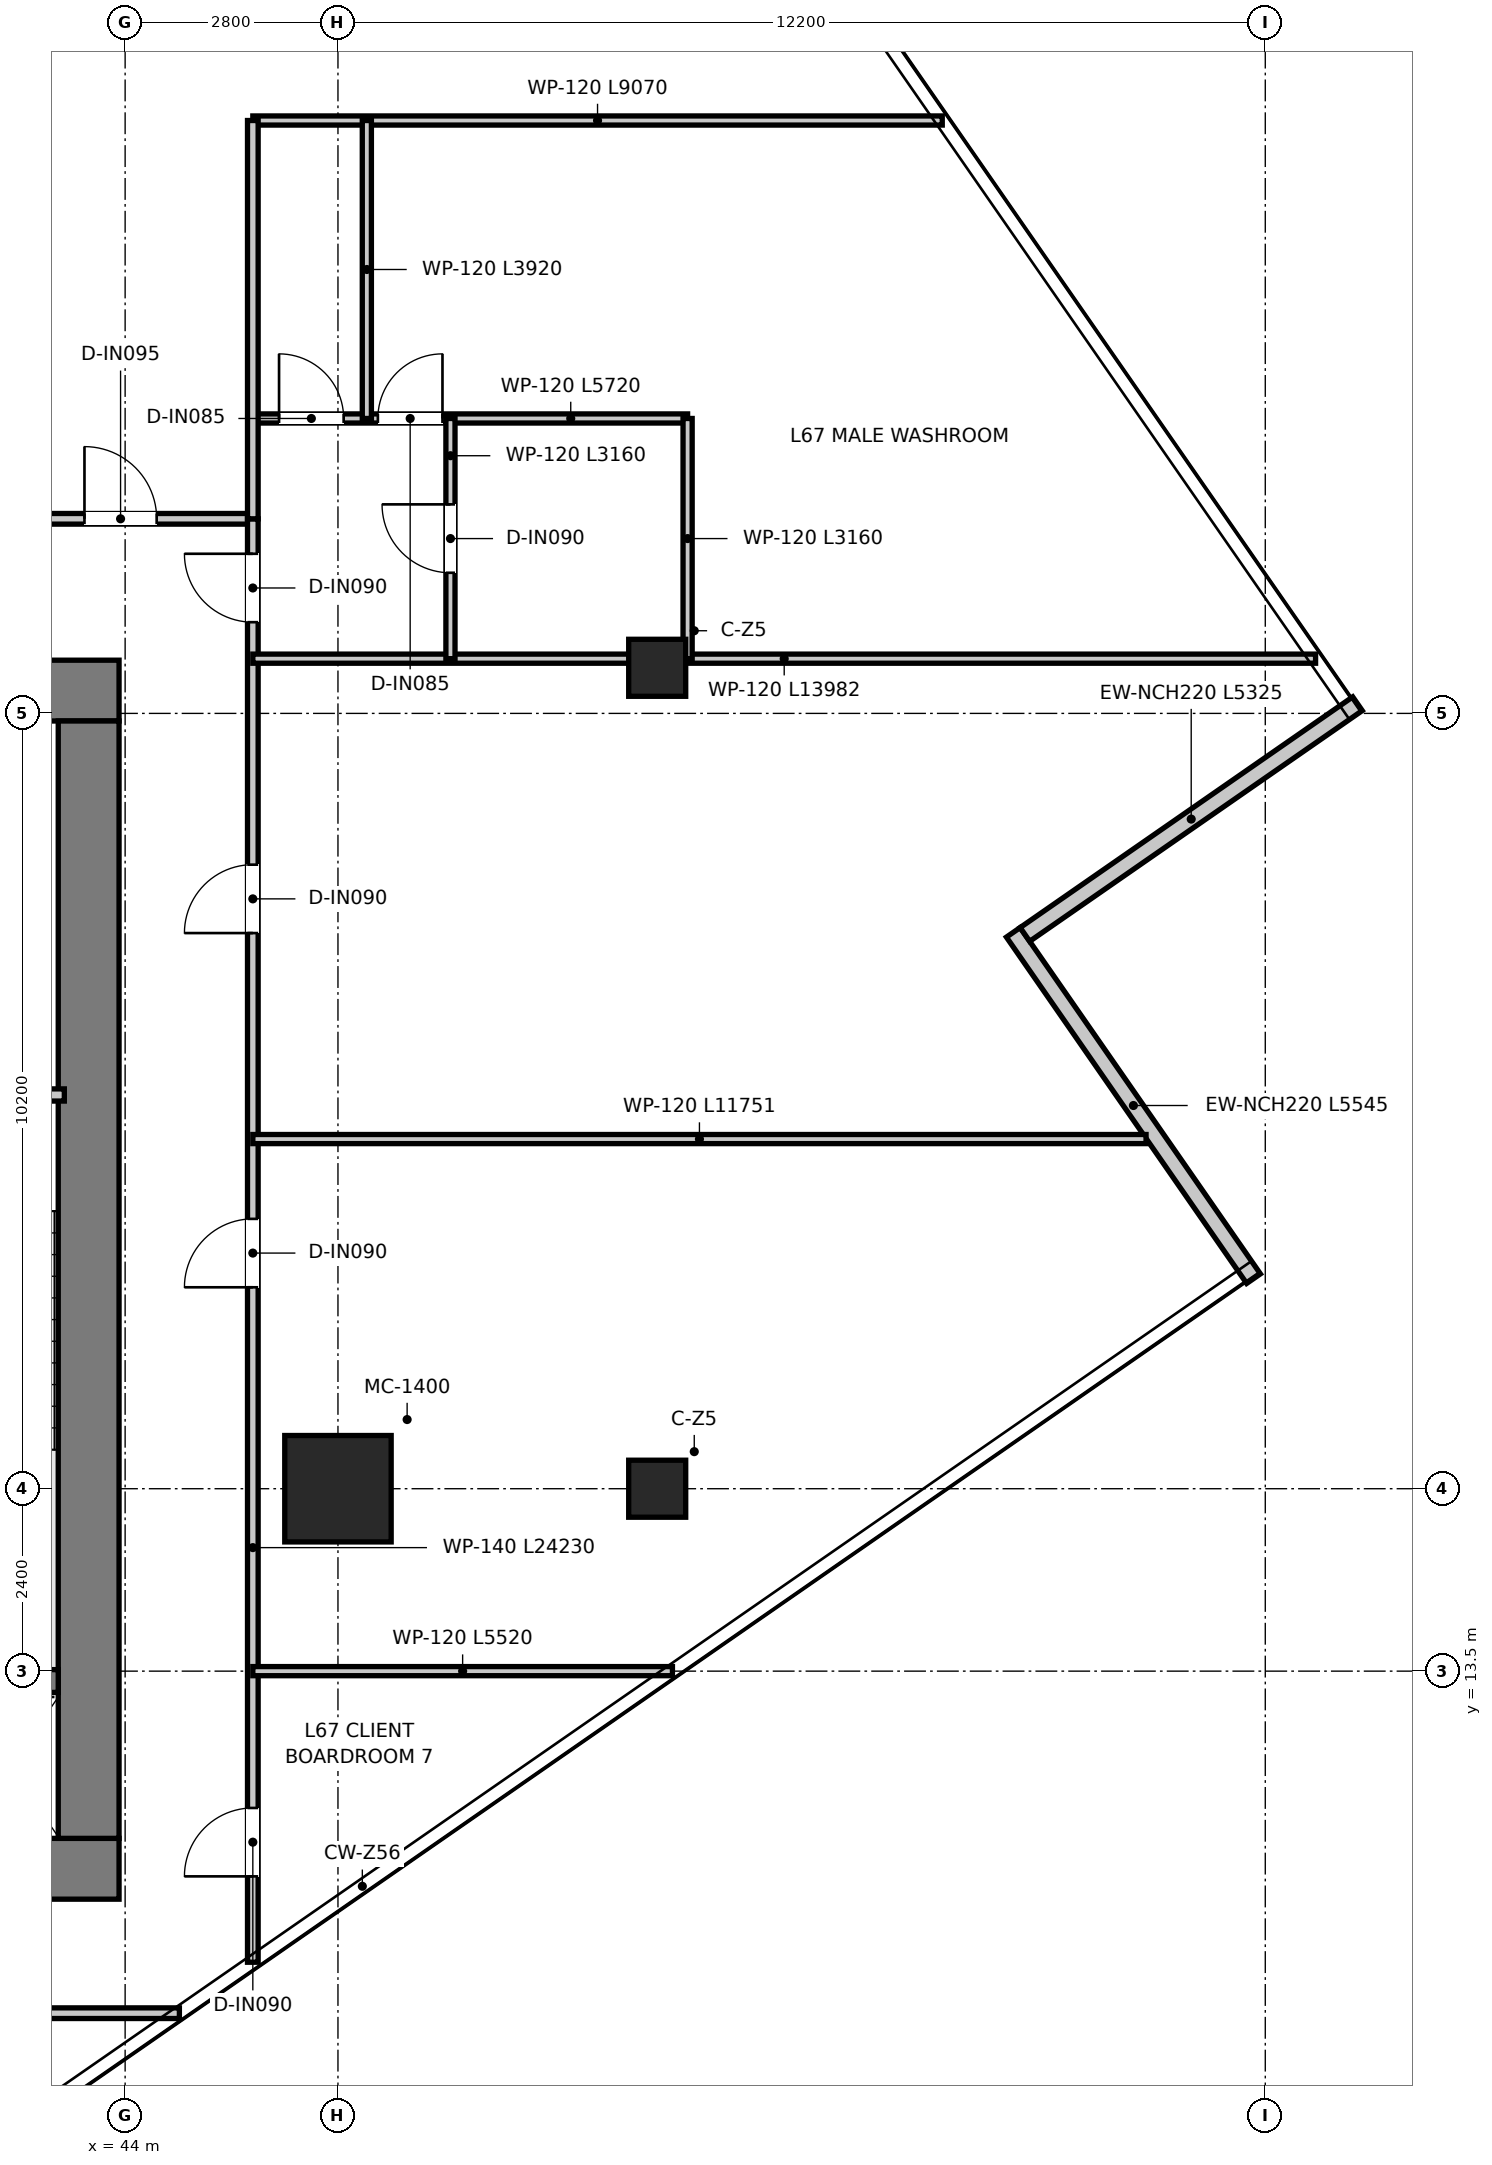
"""IFC4 building model, lengths in metres.
Left out: names, types, materials, properties, quantities, classifications, styles, units other than length and angle.
Written with IfcOpenShell. Run it as: python <this file> out.ifc"""

import sys

from ifc_helpers import new_model, si_unit, direction, frame, frame_2d, origin, origin_2d, place, context, subcontext, project, spatial, rectangle, extrude, source, transform, mapped, element, fill, save


model = new_model("IFC4")
c1 = context("Model", 3, precision=1e-05, world=origin(), true_north=direction((0.0, 1.0)))
c2 = subcontext(c1, "Body", "Model", "MODEL_VIEW")
j1 = project(units=[si_unit("LENGTHUNIT", "METRE"), si_unit("PLANEANGLEUNIT", "RADIAN")], contexts=[c1])
p1 = place(None, origin())
s1 = spatial("IfcSite", under=j1, at=p1, CompositionType="ELEMENT")
p2 = place(p1, origin())
s2 = spatial("IfcBuilding", under=s1, at=p2, CompositionType="ELEMENT")
p3 = place(p2, frame((0.0, 0.0, 275.3)))
s3 = spatial("IfcBuildingStorey", under=s2, at=p3, CompositionType="ELEMENT", Elevation=275.3)
p4 = place(p3, frame((28.08, 10.9, 0.0), z_axis=(0.0, 0.0, 1.0), x_axis=(1.0, 0.0, 0.0)))
e1 = element("IfcWall", 1, at=p4, inside=s3, PredefinedType="SHEAR", context=c2, shape_type="SweptSolid", body=[
    extrude(rectangle(XDim=15.84, YDim=0.8, at=frame_2d((7.92, 0.0))), origin(), (0.0, 0.0, 1.0), 3.95),
])
p5 = place(p3, frame((28.08, 26.4, 0.0), z_axis=(0.0, 0.0, 1.0), x_axis=(1.0, 0.0, 0.0)))
e2 = element("IfcWall", 2, at=p5, inside=s3, PredefinedType="SHEAR", context=c2, shape_type="SweptSolid", body=[
    extrude(rectangle(XDim=15.84, YDim=0.8, at=frame_2d((7.92, 0.0))), origin(), (0.0, 0.0, 1.0), 3.95),
])
p6 = place(p5, frame((7.22, 0.0, 0.0)))
e3 = element("IfcOpeningElement", 3, at=p6, cuts=e2, PredefinedType="OPENING", context=c2, shape_type="SweptSolid", body=[
    extrude(rectangle(XDim=1.4, YDim=2.2, at=frame_2d((0.7, 1.1))), frame((0.0, 0.41, 0.0), z_axis=(0.0, -1.0, 0.0), x_axis=(1.0, 0.0, 0.0)), (0.0, 0.0, 1.0), 0.82),
])
p7 = place(p5, frame((1.775, 0.0, 0.0)))
e4 = element("IfcOpeningElement", 4, at=p7, cuts=e2, PredefinedType="OPENING", context=c2, shape_type="SweptSolid", body=[
    extrude(rectangle(XDim=1.05, YDim=2.1, at=frame_2d((0.525, 1.05))), frame((0.0, 0.41, 0.0), z_axis=(0.0, -1.0, 0.0), x_axis=(1.0, 0.0, 0.0)), (0.0, 0.0, 1.0), 0.82),
])
p8 = place(p5, frame((13.015, 0.0, 0.0)))
e5 = element("IfcOpeningElement", 5, at=p8, cuts=e2, PredefinedType="OPENING", context=c2, shape_type="SweptSolid", body=[
    extrude(rectangle(XDim=1.05, YDim=2.1, at=frame_2d((0.525, 1.05))), frame((0.0, 0.41, 0.0), z_axis=(0.0, -1.0, 0.0), x_axis=(1.0, 0.0, 0.0)), (0.0, 0.0, 1.0), 0.82),
])
p9 = place(p3, frame((43.52, 11.3, 0.0), z_axis=(0.0, 0.0, 1.0), x_axis=(0.0, 1.0, 0.0)))
e6 = element("IfcWall", 6, at=p9, inside=s3, PredefinedType="SHEAR", context=c2, shape_type="SweptSolid", body=[
    extrude(rectangle(XDim=14.7, YDim=0.8, at=frame_2d((7.35, 0.0))), origin(), (0.0, 0.0, 1.0), 3.95),
])
p10 = place(p3, frame((40.02, 13.37, 0.0), z_axis=(0.0, 0.0, 1.0), x_axis=(1.0, 0.0, 0.0)))
e7 = element("IfcWall", 7, at=p10, inside=s3, PredefinedType="SHEAR", context=c2, shape_type="SweptSolid", body=[
    extrude(rectangle(XDim=3.1, YDim=0.3, at=frame_2d((1.55, 0.0))), origin(), (0.0, 0.0, 1.0), 3.95),
])
m1 = source(origin(), c2, "Body", "SweptSolid", [
    extrude(rectangle(XDim=1.4, YDim=1.4, at=origin_2d()), origin(), (0.0, 0.0, 1.0), 3.95),
])
p11 = place(p3, frame((46.8, 15.9, 0.0), z_axis=(0.0, 0.0, 1.0), x_axis=(1.0, 0.0, 0.0)))
e8 = element("IfcColumn", 8, at=p11, inside=s3, PredefinedType="USERDEFINED", context=c2, shape_type="MappedRepresentation", body=[
    mapped(m1, transform((0.0, 0.0, 0.0), x_axis=(1.0, 0.0, 0.0), y_axis=(0.0, 1.0, 0.0), z_axis=(0.0, 0.0, 1.0), scale=1.0)),
])
m2 = source(origin(), c2, "Body", "SweptSolid", [
    extrude(rectangle(XDim=0.75, YDim=0.75, at=origin_2d()), origin(), (0.0, 0.0, 1.0), 3.95),
])
for number, where, z_axis, x_axis in (
    (9, (51.0, 26.7, 0.0), (0.0, 0.0, 1.0), (1.0, 0.0, 0.0)),
    (10, (51.0, 15.9, 0.0), (0.0, 0.0, 1.0), (1.0, 0.0, 0.0)),
):
    element("IfcColumn", number, at=place(p3, frame(where, z_axis=z_axis, x_axis=x_axis)), inside=s3, PredefinedType="COLUMN", context=c2, shape_type="MappedRepresentation", body=[
        mapped(m2, transform((0.0, 0.0, 0.0), x_axis=(1.0, 0.0, 0.0), y_axis=(0.0, 1.0, 0.0), z_axis=(0.0, 0.0, 1.0), scale=1.0)),
    ])
p12 = place(p3, frame((58.845, 18.663, 0.0), z_axis=(0.0, 0.0, 1.0), x_axis=(-0.569988141022, 0.821652918874, 0.0)))
e11 = element("IfcWall", 11, at=p12, inside=s3, PredefinedType="ELEMENTEDWALL", context=c2, shape_type="SweptSolid", body=[
    extrude(rectangle(XDim=5.545, YDim=0.22, at=frame_2d((2.772, 0.0))), origin(), (0.0, 0.0, 1.0), 3.67),
])
p13 = place(p3, frame((55.838, 23.192, 0.0), z_axis=(0.0, 0.0, 1.0), x_axis=(0.821652092748, 0.569989331903, 0.0)))
e12 = element("IfcWall", 12, at=p13, inside=s3, PredefinedType="ELEMENTEDWALL", context=c2, shape_type="SweptSolid", body=[
    extrude(rectangle(XDim=5.325, YDim=0.22, at=frame_2d((2.663, 0.0))), origin(), (0.0, 0.0, 1.0), 3.67),
])
p14 = place(p3, frame((40.04, 21.08, 0.0), z_axis=(0.0, 0.0, 1.0), x_axis=(1.0, 0.0, 0.0)))
e13 = element("IfcWall", 13, at=p14, inside=s3, PredefinedType="PARTITIONING", context=c2, shape_type="SweptSolid", body=[
    extrude(rectangle(XDim=3.16, YDim=0.16, at=frame_2d((1.58, 0.0))), origin(), (0.0, 0.0, 1.0), 3.67),
])
p15 = place(p14, frame((1.055, 0.0, 0.0)))
e14 = element("IfcOpeningElement", 14, at=p15, cuts=e13, PredefinedType="OPENING", context=c2, shape_type="SweptSolid", body=[
    extrude(rectangle(XDim=1.05, YDim=2.1, at=frame_2d((0.525, 1.05))), frame((0.0, 0.09, 0.0), z_axis=(0.0, -1.0, 0.0), x_axis=(1.0, 0.0, 0.0)), (0.0, 0.0, 1.0), 0.18),
])
p16 = place(p3, frame((26.32, 28.66, 0.0), z_axis=(0.0, 0.0, 1.0), x_axis=(1.0, 0.0, 0.0)))
e15 = element("IfcWall", 15, at=p16, inside=s3, PredefinedType="PARTITIONING", context=c2, shape_type="SweptSolid", body=[
    extrude(rectangle(XDim=19.36, YDim=0.14, at=frame_2d((9.68, 0.0))), origin(), (0.0, 0.0, 1.0), 3.18),
])
p17 = place(p16, frame((1.265, 0.0, 0.0)))
e16 = element("IfcOpeningElement", 16, at=p17, cuts=e15, PredefinedType="OPENING", context=c2, shape_type="SweptSolid", body=[
    extrude(rectangle(XDim=0.95, YDim=2.1, at=frame_2d((0.475, 1.05))), frame((0.0, 0.08, 0.0), z_axis=(0.0, -1.0, 0.0), x_axis=(1.0, 0.0, 0.0)), (0.0, 0.0, 1.0), 0.16),
])
p18 = place(p16, frame((6.105, 0.0, 0.0)))
e17 = element("IfcOpeningElement", 17, at=p18, cuts=e15, PredefinedType="OPENING", context=c2, shape_type="SweptSolid", body=[
    extrude(rectangle(XDim=0.95, YDim=2.1, at=frame_2d((0.475, 1.05))), frame((0.0, 0.08, 0.0), z_axis=(0.0, -1.0, 0.0), x_axis=(1.0, 0.0, 0.0)), (0.0, 0.0, 1.0), 0.16),
])
p19 = place(p16, frame((12.305, 0.0, 0.0)))
e18 = element("IfcOpeningElement", 18, at=p19, cuts=e15, PredefinedType="OPENING", context=c2, shape_type="SweptSolid", body=[
    extrude(rectangle(XDim=0.95, YDim=2.1, at=frame_2d((0.475, 1.05))), frame((0.0, 0.08, 0.0), z_axis=(0.0, -1.0, 0.0), x_axis=(1.0, 0.0, 0.0)), (0.0, 0.0, 1.0), 0.16),
])
p20 = place(p16, frame((17.145, 0.0, 0.0)))
e19 = element("IfcOpeningElement", 19, at=p20, cuts=e15, PredefinedType="OPENING", context=c2, shape_type="SweptSolid", body=[
    extrude(rectangle(XDim=0.95, YDim=2.1, at=frame_2d((0.475, 1.05))), frame((0.0, 0.08, 0.0), z_axis=(0.0, -1.0, 0.0), x_axis=(1.0, 0.0, 0.0)), (0.0, 0.0, 1.0), 0.16),
])
p21 = place(p3, frame((45.68, 9.67, 0.0), z_axis=(0.0, 0.0, 1.0), x_axis=(0.0, 1.0, 0.0)))
e20 = element("IfcWall", 20, at=p21, inside=s3, PredefinedType="PARTITIONING", context=c2, shape_type="SweptSolid", body=[
    extrude(rectangle(XDim=18.99, YDim=0.14, at=frame_2d((9.495, 0.0))), origin(), (0.0, 0.0, 1.0), 3.13),
])
p22 = place(p21, frame((17.63, 0.0, 0.0)))
e21 = element("IfcOpeningElement", 21, at=p22, cuts=e20, PredefinedType="OPENING", context=c2, shape_type="SweptSolid", body=[
    extrude(rectangle(XDim=0.9, YDim=2.1, at=frame_2d((0.45, 1.05))), frame((0.0, 0.08, 0.0), z_axis=(0.0, -1.0, 0.0), x_axis=(1.0, 0.0, 0.0)), (0.0, 0.0, 1.0), 0.16),
])
p23 = place(p21, frame((1.13, 0.0, 0.0)))
e22 = element("IfcOpeningElement", 22, at=p23, cuts=e20, PredefinedType="OPENING", context=c2, shape_type="SweptSolid", body=[
    extrude(rectangle(XDim=0.9, YDim=2.1, at=frame_2d((0.45, 1.05))), frame((0.0, 0.08, 0.0), z_axis=(0.0, -1.0, 0.0), x_axis=(1.0, 0.0, 0.0)), (0.0, 0.0, 1.0), 0.16),
])
p24 = place(p21, frame((8.88, 0.0, 0.0)))
e23 = element("IfcOpeningElement", 23, at=p24, cuts=e20, PredefinedType="OPENING", context=c2, shape_type="SweptSolid", body=[
    extrude(rectangle(XDim=0.9, YDim=2.1, at=frame_2d((0.45, 1.05))), frame((0.0, 0.08, 0.0), z_axis=(0.0, -1.0, 0.0), x_axis=(1.0, 0.0, 0.0)), (0.0, 0.0, 1.0), 0.16),
])
p25 = place(p21, frame((13.54, 0.0, 0.0)))
e24 = element("IfcOpeningElement", 24, at=p25, cuts=e20, PredefinedType="OPENING", context=c2, shape_type="SweptSolid", body=[
    extrude(rectangle(XDim=0.9, YDim=2.1, at=frame_2d((0.45, 1.05))), frame((0.0, 0.08, 0.0), z_axis=(0.0, -1.0, 0.0), x_axis=(1.0, 0.0, 0.0)), (0.0, 0.0, 1.0), 0.16),
])
p26 = place(p3, frame((24.534, 9.0, 0.0), z_axis=(0.0, 0.0, 1.0), x_axis=(1.0, 0.0, 0.0)))
e25 = element("IfcWall", 25, at=p26, inside=s3, PredefinedType="PARTITIONING", context=c2, shape_type="SweptSolid", body=[
    extrude(rectangle(XDim=20.18, YDim=0.14, at=frame_2d((10.09, 0.0))), origin(), (0.0, 0.0, 1.0), 3.67),
])
p27 = place(p26, frame((7.041, 0.0, 0.0)))
e26 = element("IfcOpeningElement", 26, at=p27, cuts=e25, PredefinedType="OPENING", context=c2, shape_type="SweptSolid", body=[
    extrude(rectangle(XDim=0.85, YDim=2.1, at=frame_2d((0.425, 1.05))), frame((0.0, 0.08, 0.0), z_axis=(0.0, -1.0, 0.0), x_axis=(1.0, 0.0, 0.0)), (0.0, 0.0, 1.0), 0.16),
])
p28 = place(p26, frame((15.041, 0.0, 0.0)))
e27 = element("IfcOpeningElement", 27, at=p28, cuts=e25, PredefinedType="OPENING", context=c2, shape_type="SweptSolid", body=[
    extrude(rectangle(XDim=0.85, YDim=2.1, at=frame_2d((0.425, 1.05))), frame((0.0, 0.08, 0.0), z_axis=(0.0, -1.0, 0.0), x_axis=(1.0, 0.0, 0.0)), (0.0, 0.0, 1.0), 0.16),
])
p29 = place(p3, frame((45.68, 26.82, 0.0), z_axis=(0.0, 0.0, 1.0), x_axis=(1.0, 0.0, 0.0)))
e28 = element("IfcWall", 28, at=p29, inside=s3, PredefinedType="PARTITIONING", context=c2, shape_type="SweptSolid", body=[
    extrude(rectangle(XDim=13.982, YDim=0.12, at=frame_2d((6.991, 0.0))), origin(), (0.0, 0.0, 1.0), 3.13),
])
p30 = place(p3, frame((45.68, 33.9, 0.0), z_axis=(0.0, 0.0, 1.0), x_axis=(1.0, 0.0, 0.0)))
e29 = element("IfcWall", 29, at=p30, inside=s3, PredefinedType="PARTITIONING", context=c2, shape_type="SweptSolid", body=[
    extrude(rectangle(XDim=9.07, YDim=0.12, at=frame_2d((4.535, 0.0))), origin(), (0.0, 0.0, 1.0), 3.13),
])
p31 = place(p3, frame((45.68, 29.98, 0.0), z_axis=(0.0, 0.0, 1.0), x_axis=(1.0, 0.0, 0.0)))
e30 = element("IfcWall", 30, at=p31, inside=s3, PredefinedType="PARTITIONING", context=c2, shape_type="SweptSolid", body=[
    extrude(rectangle(XDim=5.72, YDim=0.12, at=frame_2d((2.86, 0.0))), origin(), (0.0, 0.0, 1.0), 3.13),
])
p32 = place(p31, frame((1.645, 0.0, 0.0)))
e31 = element("IfcOpeningElement", 31, at=p32, cuts=e30, PredefinedType="OPENING", context=c2, shape_type="SweptSolid", body=[
    extrude(rectangle(XDim=0.85, YDim=2.1, at=frame_2d((0.425, 1.05))), frame((0.0, 0.07, 0.0), z_axis=(0.0, -1.0, 0.0), x_axis=(1.0, 0.0, 0.0)), (0.0, 0.0, 1.0), 0.14),
])
p33 = place(p31, frame((0.345, 0.0, 0.0)))
e32 = element("IfcOpeningElement", 32, at=p33, cuts=e30, PredefinedType="OPENING", context=c2, shape_type="SweptSolid", body=[
    extrude(rectangle(XDim=0.85, YDim=2.1, at=frame_2d((0.425, 1.05))), frame((0.0, 0.07, 0.0), z_axis=(0.0, -1.0, 0.0), x_axis=(1.0, 0.0, 0.0)), (0.0, 0.0, 1.0), 0.14),
])
p34 = place(p3, frame((51.4, 26.82, 0.0), z_axis=(0.0, 0.0, 1.0), x_axis=(0.0, 1.0, 0.0)))
e33 = element("IfcWall", 33, at=p34, inside=s3, PredefinedType="PARTITIONING", context=c2, shape_type="SweptSolid", body=[
    extrude(rectangle(XDim=3.16, YDim=0.12, at=frame_2d((1.58, 0.0))), origin(), (0.0, 0.0, 1.0), 3.67),
])
p35 = place(p3, frame((48.28, 26.82, 0.0), z_axis=(0.0, 0.0, 1.0), x_axis=(0.0, 1.0, 0.0)))
e34 = element("IfcWall", 34, at=p35, inside=s3, PredefinedType="PARTITIONING", context=c2, shape_type="SweptSolid", body=[
    extrude(rectangle(XDim=3.16, YDim=0.12, at=frame_2d((1.58, 0.0))), origin(), (0.0, 0.0, 1.0), 3.18),
])
p36 = place(p35, frame((1.13, 0.0, 0.0)))
e35 = element("IfcOpeningElement", 35, at=p36, cuts=e34, PredefinedType="OPENING", context=c2, shape_type="SweptSolid", body=[
    extrude(rectangle(XDim=0.9, YDim=2.1, at=frame_2d((0.45, 1.05))), frame((0.0, 0.07, 0.0), z_axis=(0.0, -1.0, 0.0), x_axis=(1.0, 0.0, 0.0)), (0.0, 0.0, 1.0), 0.14),
])
p37 = place(p3, frame((47.18, 29.98, 0.0), z_axis=(0.0, 0.0, 1.0), x_axis=(0.0, 1.0, 0.0)))
e36 = element("IfcWall", 36, at=p37, inside=s3, PredefinedType="PARTITIONING", context=c2, shape_type="SweptSolid", body=[
    extrude(rectangle(XDim=3.92, YDim=0.12, at=frame_2d((1.96, 0.0))), origin(), (0.0, 0.0, 1.0), 3.31),
])
p38 = place(p3, frame((45.68, 28.66, 0.0), z_axis=(0.0, 0.0, 1.0), x_axis=(0.0, 1.0, 0.0)))
e37 = element("IfcWall", 37, at=p38, inside=s3, PredefinedType="PARTITIONING", context=c2, shape_type="SweptSolid", body=[
    extrude(rectangle(XDim=5.24, YDim=0.14, at=frame_2d((2.62, 0.0))), origin(), (0.0, 0.0, 1.0), 3.43),
])
p39 = place(p3, frame((45.68, 13.5, 0.0), z_axis=(0.0, 0.0, 1.0), x_axis=(1.0, 0.0, 0.0)))
e38 = element("IfcWall", 38, at=p39, inside=s3, PredefinedType="PARTITIONING", context=c2, shape_type="SweptSolid", body=[
    extrude(rectangle(XDim=5.521, YDim=0.12, at=frame_2d((2.76, 0.0))), origin(), (0.0, 0.0, 1.0), 3.18),
])
p40 = place(p3, frame((45.68, 20.5, 0.0), z_axis=(0.0, 0.0, 1.0), x_axis=(1.0, 0.0, 0.0)))
e39 = element("IfcWall", 39, at=p40, inside=s3, PredefinedType="PARTITIONING", context=c2, shape_type="SweptSolid", body=[
    extrude(rectangle(XDim=11.751, YDim=0.12, at=frame_2d((5.876, 0.0))), origin(), (0.0, 0.0, 1.0), 3.13),
])
p41 = place(p22, origin())
e40 = element("IfcDoor", 40, at=p41, inside=s3, OperationType="SINGLE_SWING_RIGHT", PredefinedType="DOOR", context=c2, shape_type="SweptSolid", body=[
    extrude(rectangle(XDim=0.9, YDim=2.1, at=frame_2d((0.45, 1.05))), frame((0.0, 0.025, 0.0), z_axis=(0.0, -1.0, 0.0), x_axis=(1.0, 0.0, 0.0)), (0.0, 0.0, 1.0), 0.05),
])
fill(e21, e40)
p42 = place(p32, origin())
e41 = element("IfcDoor", 41, at=p42, inside=s3, OperationType="SINGLE_SWING_RIGHT", PredefinedType="DOOR", context=c2, shape_type="SweptSolid", body=[
    extrude(rectangle(XDim=0.85, YDim=2.1, at=frame_2d((0.425, 1.05))), frame((0.0, 0.025, 0.0), z_axis=(0.0, -1.0, 0.0), x_axis=(1.0, 0.0, 0.0)), (0.0, 0.0, 1.0), 0.05),
])
fill(e31, e41)
p43 = place(p33, origin())
e42 = element("IfcDoor", 42, at=p43, inside=s3, OperationType="SINGLE_SWING_LEFT", PredefinedType="DOOR", context=c2, shape_type="SweptSolid", body=[
    extrude(rectangle(XDim=0.85, YDim=2.1, at=frame_2d((0.425, 1.05))), frame((0.0, 0.025, 0.0), z_axis=(0.0, -1.0, 0.0), x_axis=(1.0, 0.0, 0.0)), (0.0, 0.0, 1.0), 0.05),
])
fill(e32, e42)
p44 = place(p36, origin())
e43 = element("IfcDoor", 43, at=p44, inside=s3, OperationType="SINGLE_SWING_RIGHT", PredefinedType="DOOR", context=c2, shape_type="SweptSolid", body=[
    extrude(rectangle(XDim=0.9, YDim=2.1, at=frame_2d((0.45, 1.05))), frame((0.0, 0.025, 0.0), z_axis=(0.0, -1.0, 0.0), x_axis=(1.0, 0.0, 0.0)), (0.0, 0.0, 1.0), 0.05),
])
fill(e35, e43)
p45 = place(p20, origin())
e44 = element("IfcDoor", 44, at=p45, inside=s3, OperationType="SINGLE_SWING_LEFT", PredefinedType="DOOR", context=c2, shape_type="SweptSolid", body=[
    extrude(rectangle(XDim=0.95, YDim=2.1, at=frame_2d((0.475, 1.05))), frame((0.0, 0.025, 0.0), z_axis=(0.0, -1.0, 0.0), x_axis=(1.0, 0.0, 0.0)), (0.0, 0.0, 1.0), 0.05),
])
fill(e19, e44)
p46 = place(p23, origin())
e45 = element("IfcDoor", 45, at=p46, inside=s3, OperationType="SINGLE_SWING_LEFT", PredefinedType="DOOR", context=c2, shape_type="SweptSolid", body=[
    extrude(rectangle(XDim=0.9, YDim=2.1, at=frame_2d((0.45, 1.05))), frame((0.0, 0.025, 0.0), z_axis=(0.0, -1.0, 0.0), x_axis=(1.0, 0.0, 0.0)), (0.0, 0.0, 1.0), 0.05),
])
fill(e22, e45)
p47 = place(p24, origin())
e46 = element("IfcDoor", 46, at=p47, inside=s3, OperationType="SINGLE_SWING_LEFT", PredefinedType="DOOR", context=c2, shape_type="SweptSolid", body=[
    extrude(rectangle(XDim=0.9, YDim=2.1, at=frame_2d((0.45, 1.05))), frame((0.0, 0.025, 0.0), z_axis=(0.0, -1.0, 0.0), x_axis=(1.0, 0.0, 0.0)), (0.0, 0.0, 1.0), 0.05),
])
fill(e23, e46)
p48 = place(p25, origin())
e47 = element("IfcDoor", 47, at=p48, inside=s3, OperationType="SINGLE_SWING_LEFT", PredefinedType="DOOR", context=c2, shape_type="SweptSolid", body=[
    extrude(rectangle(XDim=0.9, YDim=2.1, at=frame_2d((0.45, 1.05))), frame((0.0, 0.025, 0.0), z_axis=(0.0, -1.0, 0.0), x_axis=(1.0, 0.0, 0.0)), (0.0, 0.0, 1.0), 0.05),
])
fill(e24, e47)
save(model, sys.argv[1])
